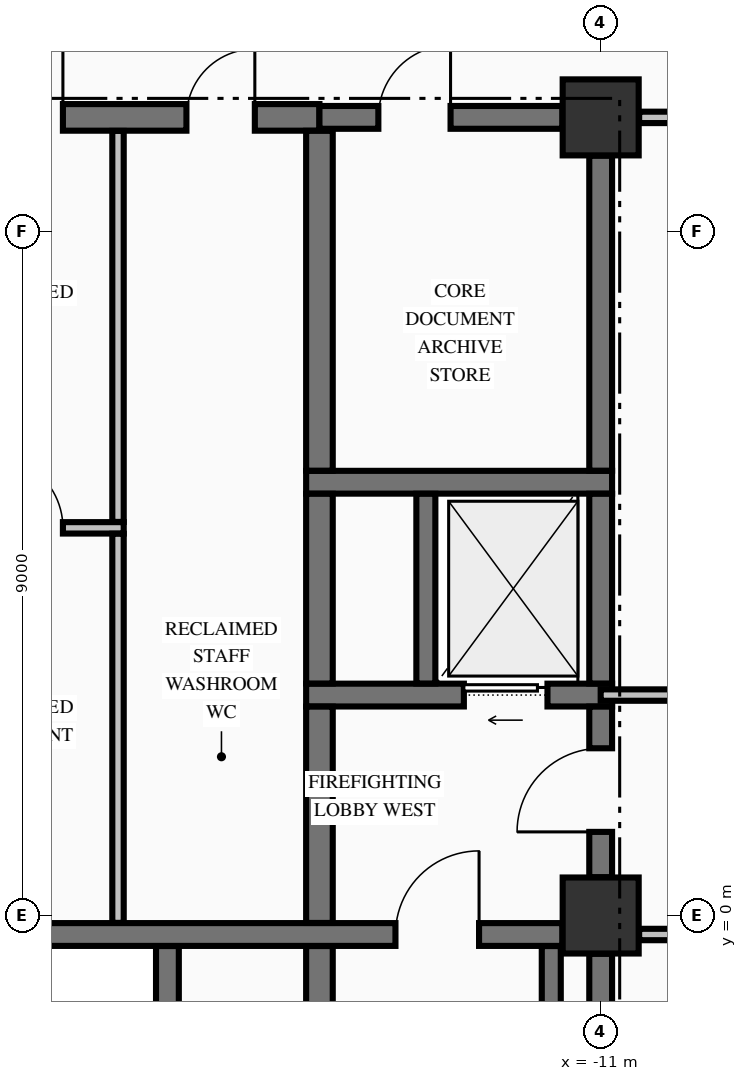
"""IFC4 building model, lengths in metres.
Left out: names, types, materials, properties, quantities, classifications, styles, units other than length and angle.
Written with IfcOpenShell. Run it as: python <this file> out.ifc"""

import sys

from ifc_helpers import new_model, si_unit, direction, frame, frame_2d, origin, origin_2d, place, context, subcontext, project, spatial, rectangle, extrude, element, fill, save


model = new_model("IFC4")
c1 = context("Model", 3, precision=1e-05, world=origin(), true_north=direction((0.0, 1.0)))
c2 = subcontext(c1, "Body", "Model", "MODEL_VIEW")
j1 = project(units=[si_unit("LENGTHUNIT", "METRE"), si_unit("PLANEANGLEUNIT", "RADIAN")], contexts=[c1])
p1 = place(None, origin())
s1 = spatial("IfcSite", under=j1, at=p1, CompositionType="ELEMENT")
p2 = place(p1, origin())
s2 = spatial("IfcBuilding", under=s1, at=p2, CompositionType="ELEMENT")
p3 = place(p2, frame((0.0, 0.0, 112.78)))
s3 = spatial("IfcBuildingStorey", under=s2, at=p3, CompositionType="ELEMENT", Elevation=112.78)
for number, where, z_axis, x_axis in (
    (1, (-11.0, 0.0, -0.25), (0.0, 0.0, 1.0), (1.0, 0.0, 0.0)),
    (2, (-11.0, 10.5, -0.25), (0.0, 0.0, 1.0), (1.0, 0.0, 0.0)),
):
    element("IfcColumn", number, at=place(p3, frame(where, z_axis=z_axis, x_axis=x_axis)), inside=s3, PredefinedType="COLUMN", context=c2, shape_type="SweptSolid", body=[
        extrude(rectangle(XDim=1.0, YDim=1.0, at=origin_2d()), origin(), (0.0, 0.0, 1.0), 3.395),
    ])
p4 = place(p3, frame((-19.496, -0.25, 0.0), z_axis=(0.0, 0.0, 1.0), x_axis=(1.0, 0.0, 0.0)))
e3 = element("IfcWall", 3, at=p4, inside=s3, PredefinedType="SHEAR", context=c2, shape_type="SweptSolid", body=[
    extrude(rectangle(XDim=7.992, YDim=0.3, at=frame_2d((3.996, 0.0))), origin(), (0.0, 0.0, 1.0), 3.145),
])
p5 = place(p4, frame((5.796, 0.0, 0.0)))
e4 = element("IfcOpeningElement", 4, at=p5, cuts=e3, PredefinedType="OPENING", context=c2, shape_type="SweptSolid", body=[
    extrude(rectangle(XDim=1.1, YDim=2.15, at=frame_2d((0.55, 1.075))), frame((0.0, 0.16, 0.0), z_axis=(0.0, -1.0, 0.0), x_axis=(1.0, 0.0, 0.0)), (0.0, 0.0, 1.0), 0.32),
])
p6 = place(p3, frame((-14.875, 2.9, 0.0), z_axis=(0.0, 0.0, 1.0), x_axis=(1.0, 0.0, 0.0)))
e5 = element("IfcWall", 5, at=p6, inside=s3, PredefinedType="SHEAR", context=c2, shape_type="SweptSolid", body=[
    extrude(rectangle(XDim=4.025, YDim=0.3, at=frame_2d((2.012, 0.0))), origin(), (0.0, 0.0, 1.0), 3.145),
])
p7 = place(p6, frame((2.075, 0.0, 0.0)))
e6 = element("IfcOpeningElement", 6, at=p7, cuts=e5, PredefinedType="OPENING", context=c2, shape_type="SweptSolid", body=[
    extrude(rectangle(XDim=1.1, YDim=2.2, at=frame_2d((0.55, 1.1))), frame((0.0, 0.16, 0.0), z_axis=(0.0, -1.0, 0.0), x_axis=(1.0, 0.0, 0.0)), (0.0, 0.0, 1.0), 0.32),
])
p8 = place(p3, frame((-14.875, 5.7, 0.0), z_axis=(0.0, 0.0, 1.0), x_axis=(1.0, 0.0, 0.0)))
e7 = element("IfcWall", 7, at=p8, inside=s3, PredefinedType="SHEAR", context=c2, shape_type="SweptSolid", body=[
    extrude(rectangle(XDim=4.025, YDim=0.3, at=frame_2d((2.012, 0.0))), origin(), (0.0, 0.0, 1.0), 3.145),
])
p9 = place(p3, frame((-19.496, 10.5, 0.0), z_axis=(0.0, 0.0, 1.0), x_axis=(1.0, 0.0, 0.0)))
e8 = element("IfcWall", 8, at=p9, inside=s3, PredefinedType="SHEAR", context=c2, shape_type="SweptSolid", body=[
    extrude(rectangle(XDim=4.796, YDim=0.35, at=frame_2d((2.398, 0.0))), origin(), (0.0, 0.0, 1.0), 3.145),
])
p10 = place(p9, frame((0.471, 0.0, 0.0)))
e9 = element("IfcOpeningElement", 9, at=p10, cuts=e8, PredefinedType="OPENING", context=c2, shape_type="SweptSolid", body=[
    extrude(rectangle(XDim=0.95, YDim=2.15, at=frame_2d((0.475, 1.075))), frame((0.0, 0.185, 0.0), z_axis=(0.0, -1.0, 0.0), x_axis=(1.0, 0.0, 0.0)), (0.0, 0.0, 1.0), 0.37),
])
p11 = place(p9, frame((3.046, 0.0, 0.0)))
e10 = element("IfcOpeningElement", 10, at=p11, cuts=e8, PredefinedType="OPENING", context=c2, shape_type="SweptSolid", body=[
    extrude(rectangle(XDim=0.9, YDim=2.15, at=frame_2d((0.45, 1.075))), frame((0.0, 0.185, 0.0), z_axis=(0.0, -1.0, 0.0), x_axis=(1.0, 0.0, 0.0)), (0.0, 0.0, 1.0), 0.37),
])
p12 = place(p3, frame((-14.7, 10.5, 0.0), z_axis=(0.0, 0.0, 1.0), x_axis=(1.0, 0.0, 0.0)))
e11 = element("IfcWall", 11, at=p12, inside=s3, PredefinedType="SHEAR", context=c2, shape_type="SweptSolid", body=[
    extrude(rectangle(XDim=3.196, YDim=0.3, at=frame_2d((1.598, 0.0))), origin(), (0.0, 0.0, 1.0), 3.145),
])
p13 = place(p12, frame((0.775, 0.0, 0.0)))
e12 = element("IfcOpeningElement", 12, at=p13, cuts=e11, PredefinedType="OPENING", context=c2, shape_type="SweptSolid", body=[
    extrude(rectangle(XDim=0.95, YDim=2.15, at=frame_2d((0.475, 1.075))), frame((0.0, 0.16, 0.0), z_axis=(0.0, -1.0, 0.0), x_axis=(1.0, 0.0, 0.0)), (0.0, 0.0, 1.0), 0.32),
])
p14 = place(p3, frame((-10.494, -0.25, 0.0), z_axis=(0.0, 0.0, 1.0), x_axis=(1.0, 0.0, 0.0)))
e13 = element("IfcWall", 13, at=p14, inside=s3, PredefinedType="PARTITIONING", context=c2, shape_type="SweptSolid", body=[
    extrude(rectangle(XDim=20.988, YDim=0.15, at=frame_2d((10.494, 0.0))), origin(), (0.0, 0.0, 1.0), 3.145),
])
p15 = place(p14, frame((13.994, 0.0, 0.0)))
e14 = element("IfcOpeningElement", 14, at=p15, cuts=e13, PredefinedType="OPENING", context=c2, shape_type="SweptSolid", body=[
    extrude(rectangle(XDim=1.1, YDim=2.15, at=frame_2d((0.55, 1.075))), frame((0.0, 0.085, 0.0), z_axis=(0.0, -1.0, 0.0), x_axis=(1.0, 0.0, 0.0)), (0.0, 0.0, 1.0), 0.17),
])
p16 = place(p14, frame((5.939, 0.0, 0.0)))
e15 = element("IfcOpeningElement", 15, at=p16, cuts=e13, PredefinedType="OPENING", context=c2, shape_type="SweptSolid", body=[
    extrude(rectangle(XDim=1.05, YDim=2.15, at=frame_2d((0.525, 1.075))), frame((0.0, 0.085, 0.0), z_axis=(0.0, -1.0, 0.0), x_axis=(1.0, 0.0, 0.0)), (0.0, 0.0, 1.0), 0.17),
])
p17 = place(p14, frame((18.089, 0.0, 0.0)))
e16 = element("IfcOpeningElement", 16, at=p17, cuts=e13, PredefinedType="OPENING", context=c2, shape_type="SweptSolid", body=[
    extrude(rectangle(XDim=0.95, YDim=2.15, at=frame_2d((0.475, 1.075))), frame((0.0, 0.085, 0.0), z_axis=(0.0, -1.0, 0.0), x_axis=(1.0, 0.0, 0.0)), (0.0, 0.0, 1.0), 0.17),
])
p18 = place(p3, frame((-11.0, 2.9, 0.0), z_axis=(0.0, 0.0, 1.0), x_axis=(1.0, 0.0, 0.0)))
e17 = element("IfcWall", 17, at=p18, inside=s3, PredefinedType="PARTITIONING", context=c2, shape_type="SweptSolid", body=[
    extrude(rectangle(XDim=22.0, YDim=0.15, at=frame_2d((11.0, 0.0))), origin(), (0.0, 0.0, 1.0), 3.145),
])
p19 = place(p18, frame((14.5, 0.0, 0.0)))
e18 = element("IfcOpeningElement", 18, at=p19, cuts=e17, PredefinedType="OPENING", context=c2, shape_type="SweptSolid", body=[
    extrude(rectangle(XDim=1.1, YDim=2.15, at=frame_2d((0.55, 1.075))), frame((0.0, 0.085, 0.0), z_axis=(0.0, -1.0, 0.0), x_axis=(1.0, 0.0, 0.0)), (0.0, 0.0, 1.0), 0.17),
])
p20 = place(p18, frame((6.445, 0.0, 0.0)))
e19 = element("IfcOpeningElement", 19, at=p20, cuts=e17, PredefinedType="OPENING", context=c2, shape_type="SweptSolid", body=[
    extrude(rectangle(XDim=1.05, YDim=2.15, at=frame_2d((0.525, 1.075))), frame((0.0, 0.085, 0.0), z_axis=(0.0, -1.0, 0.0), x_axis=(1.0, 0.0, 0.0)), (0.0, 0.0, 1.0), 0.17),
])
p21 = place(p18, frame((18.52, 0.0, 0.0)))
e20 = element("IfcOpeningElement", 20, at=p21, cuts=e17, PredefinedType="OPENING", context=c2, shape_type="SweptSolid", body=[
    extrude(rectangle(XDim=1.1, YDim=2.15, at=frame_2d((0.55, 1.075))), frame((0.0, 0.085, 0.0), z_axis=(0.0, -1.0, 0.0), x_axis=(1.0, 0.0, 0.0)), (0.0, 0.0, 1.0), 0.17),
])
p22 = place(p3, frame((-19.822, 5.1, 0.0), z_axis=(0.0, 0.0, 1.0), x_axis=(1.0, 0.0, 0.0)))
e21 = element("IfcWall", 21, at=p22, inside=s3, PredefinedType="PARTITIONING", context=c2, shape_type="SweptSolid", body=[
    extrude(rectangle(XDim=2.547, YDim=0.15, at=frame_2d((1.273, 0.0))), origin(), (0.0, 0.0, 1.0), 3.145),
])
p23 = place(p22, frame((0.797, 0.0, 0.0)))
e22 = element("IfcOpeningElement", 22, at=p23, cuts=e21, PredefinedType="OPENING", context=c2, shape_type="SweptSolid", body=[
    extrude(rectangle(XDim=0.95, YDim=2.15, at=frame_2d((0.475, 1.075))), frame((0.0, 0.085, 0.0), z_axis=(0.0, -1.0, 0.0), x_axis=(1.0, 0.0, 0.0)), (0.0, 0.0, 1.0), 0.17),
])
p24 = place(p3, frame((-10.494, 10.5, 0.0), z_axis=(0.0, 0.0, 1.0), x_axis=(1.0, 0.0, 0.0)))
e23 = element("IfcWall", 23, at=p24, inside=s3, PredefinedType="PARTITIONING", context=c2, shape_type="SweptSolid", body=[
    extrude(rectangle(XDim=20.988, YDim=0.15, at=frame_2d((10.494, 0.0))), origin(), (0.0, 0.0, 1.0), 3.145),
])
p25 = place(p24, frame((13.994, 0.0, 0.0)))
e24 = element("IfcOpeningElement", 24, at=p25, cuts=e23, PredefinedType="OPENING", context=c2, shape_type="SweptSolid", body=[
    extrude(rectangle(XDim=1.1, YDim=2.15, at=frame_2d((0.55, 1.075))), frame((0.0, 0.085, 0.0), z_axis=(0.0, -1.0, 0.0), x_axis=(1.0, 0.0, 0.0)), (0.0, 0.0, 1.0), 0.17),
])
p26 = place(p3, frame((-16.7, -9.773, 0.0), z_axis=(0.0, 0.0, 1.0), x_axis=(0.0, 1.0, 0.0)))
e25 = element("IfcWall", 25, at=p26, inside=s3, PredefinedType="SHEAR", context=c2, shape_type="SweptSolid", body=[
    extrude(rectangle(XDim=9.371, YDim=0.3, at=frame_2d((4.686, 0.0))), origin(), (0.0, 0.0, 1.0), 3.145),
])
p27 = place(p3, frame((-14.7, -9.773, 0.0), z_axis=(0.0, 0.0, 1.0), x_axis=(0.0, 1.0, 0.0)))
e26 = element("IfcWall", 26, at=p27, inside=s3, PredefinedType="SHEAR", context=c2, shape_type="SweptSolid", body=[
    extrude(rectangle(XDim=9.371, YDim=0.35, at=frame_2d((4.686, 0.0))), origin(), (0.0, 0.0, 1.0), 3.145),
])
p28 = place(p3, frame((-14.7, -0.098, 0.0), z_axis=(0.0, 0.0, 1.0), x_axis=(0.0, 1.0, 0.0)))
e27 = element("IfcWall", 27, at=p28, inside=s3, PredefinedType="SHEAR", context=c2, shape_type="SweptSolid", body=[
    extrude(rectangle(XDim=2.846, YDim=0.35, at=frame_2d((1.423, 0.0))), origin(), (0.0, 0.0, 1.0), 3.145),
])
p29 = place(p3, frame((-14.7, 3.052, 0.0), z_axis=(0.0, 0.0, 1.0), x_axis=(0.0, 1.0, 0.0)))
e28 = element("IfcWall", 28, at=p29, inside=s3, PredefinedType="SHEAR", context=c2, shape_type="SweptSolid", body=[
    extrude(rectangle(XDim=2.496, YDim=0.35, at=frame_2d((1.248, 0.0))), origin(), (0.0, 0.0, 1.0), 3.145),
])
p30 = place(p3, frame((-14.7, 5.852, 0.0), z_axis=(0.0, 0.0, 1.0), x_axis=(0.0, 1.0, 0.0)))
e29 = element("IfcWall", 29, at=p30, inside=s3, PredefinedType="SHEAR", context=c2, shape_type="SweptSolid", body=[
    extrude(rectangle(XDim=4.471, YDim=0.35, at=frame_2d((2.235, 0.0))), origin(), (0.0, 0.0, 1.0), 3.145),
])
p31 = place(p3, frame((-13.3, 3.052, 0.0), z_axis=(0.0, 0.0, 1.0), x_axis=(0.0, 1.0, 0.0)))
e30 = element("IfcWall", 30, at=p31, inside=s3, PredefinedType="SOLIDWALL", context=c2, shape_type="SweptSolid", body=[
    extrude(rectangle(XDim=2.496, YDim=0.25, at=frame_2d((1.248, 0.0))), origin(), (0.0, 0.0, 1.0), 3.145),
])
p32 = place(p3, frame((-11.65, -9.798, 0.0), z_axis=(0.0, 0.0, 1.0), x_axis=(0.0, 1.0, 0.0)))
e31 = element("IfcWall", 31, at=p32, inside=s3, PredefinedType="SOLIDWALL", context=c2, shape_type="SweptSolid", body=[
    extrude(rectangle(XDim=9.396, YDim=0.25, at=frame_2d((4.698, 0.0))), origin(), (0.0, 0.0, 1.0), 3.145),
])
p33 = place(p3, frame((-11.0, -9.446, 0.0), z_axis=(0.0, 0.0, 1.0), x_axis=(0.0, 1.0, 0.0)))
e32 = element("IfcWall", 32, at=p33, inside=s3, PredefinedType="SHEAR", context=c2, shape_type="SweptSolid", body=[
    extrude(rectangle(XDim=8.942, YDim=0.3, at=frame_2d((4.471, 0.0))), origin(), (0.0, 0.0, 1.0), 3.145),
])
p34 = place(p3, frame((-11.0, 0.504, 0.0), z_axis=(0.0, 0.0, 1.0), x_axis=(0.0, 1.0, 0.0)))
e33 = element("IfcWall", 33, at=p34, inside=s3, PredefinedType="SHEAR", context=c2, shape_type="SweptSolid", body=[
    extrude(rectangle(XDim=2.244, YDim=0.3, at=frame_2d((1.122, 0.0))), origin(), (0.0, 0.0, 1.0), 3.145),
])
p35 = place(p34, frame((0.596, 0.0, 0.0)))
e34 = element("IfcOpeningElement", 34, at=p35, cuts=e33, PredefinedType="OPENING", context=c2, shape_type="SweptSolid", body=[
    extrude(rectangle(XDim=1.1, YDim=2.15, at=frame_2d((0.55, 1.075))), frame((0.0, 0.16, 0.0), z_axis=(0.0, -1.0, 0.0), x_axis=(1.0, 0.0, 0.0)), (0.0, 0.0, 1.0), 0.32),
])
p36 = place(p3, frame((-11.0, 3.052, 0.0), z_axis=(0.0, 0.0, 1.0), x_axis=(0.0, 1.0, 0.0)))
e35 = element("IfcWall", 35, at=p36, inside=s3, PredefinedType="SHEAR", context=c2, shape_type="SweptSolid", body=[
    extrude(rectangle(XDim=2.496, YDim=0.3, at=frame_2d((1.248, 0.0))), origin(), (0.0, 0.0, 1.0), 3.145),
])
p37 = place(p3, frame((-11.0, 5.852, 0.0), z_axis=(0.0, 0.0, 1.0), x_axis=(0.0, 1.0, 0.0)))
e36 = element("IfcWall", 36, at=p37, inside=s3, PredefinedType="SHEAR", context=c2, shape_type="SweptSolid", body=[
    extrude(rectangle(XDim=4.144, YDim=0.3, at=frame_2d((2.072, 0.0))), origin(), (0.0, 0.0, 1.0), 3.145),
])
p38 = place(p3, frame((-17.35, -0.097, 0.0), z_axis=(0.0, 0.0, 1.0), x_axis=(0.0, 1.0, 0.0)))
e37 = element("IfcWall", 37, at=p38, inside=s3, PredefinedType="PARTITIONING", context=c2, shape_type="SweptSolid", body=[
    extrude(rectangle(XDim=5.119, YDim=0.15, at=frame_2d((2.56, 0.0))), origin(), (0.0, 0.0, 1.0), 3.145),
])
p39 = place(p3, frame((-17.35, 5.178, 0.0), z_axis=(0.0, 0.0, 1.0), x_axis=(0.0, 1.0, 0.0)))
e38 = element("IfcWall", 38, at=p39, inside=s3, PredefinedType="PARTITIONING", context=c2, shape_type="SweptSolid", body=[
    extrude(rectangle(XDim=5.144, YDim=0.15, at=frame_2d((2.572, 0.0))), origin(), (0.0, 0.0, 1.0), 3.145),
])
p40 = place(p5, origin())
e39 = element("IfcDoor", 39, at=p40, inside=s3, OperationType="SINGLE_SWING_RIGHT", PredefinedType="DOOR", context=c2, shape_type="SweptSolid", body=[
    extrude(rectangle(XDim=1.1, YDim=2.15, at=frame_2d((0.55, 1.075))), frame((0.0, 0.025, 0.0), z_axis=(0.0, -1.0, 0.0), x_axis=(1.0, 0.0, 0.0)), (0.0, 0.0, 1.0), 0.05),
])
fill(e4, e39)
p41 = place(p35, origin())
e40 = element("IfcDoor", 40, at=p41, inside=s3, OperationType="SINGLE_SWING_LEFT", PredefinedType="DOOR", context=c2, shape_type="SweptSolid", body=[
    extrude(rectangle(XDim=1.1, YDim=2.15, at=frame_2d((0.55, 1.075))), frame((0.0, 0.025, 0.0), z_axis=(0.0, -1.0, 0.0), x_axis=(1.0, 0.0, 0.0)), (0.0, 0.0, 1.0), 0.05),
])
fill(e34, e40)
p42 = place(p7, origin())
e41 = element("IfcDoor", 41, at=p42, inside=s3, OperationType="SLIDING_TO_LEFT", PredefinedType="DOOR", context=c2, shape_type="SweptSolid", body=[
    extrude(rectangle(XDim=1.1, YDim=2.2, at=frame_2d((0.55, 1.1))), frame((0.0, 0.025, 0.0), z_axis=(0.0, -1.0, 0.0), x_axis=(1.0, 0.0, 0.0)), (0.0, 0.0, 1.0), 0.05),
])
fill(e6, e41)
p43 = place(p13, origin())
e42 = element("IfcDoor", 42, at=p43, inside=s3, OperationType="SINGLE_SWING_RIGHT", PredefinedType="DOOR", context=c2, shape_type="SweptSolid", body=[
    extrude(rectangle(XDim=0.95, YDim=2.15, at=frame_2d((0.475, 1.075))), frame((0.0, 0.025, 0.0), z_axis=(0.0, -1.0, 0.0), x_axis=(1.0, 0.0, 0.0)), (0.0, 0.0, 1.0), 0.05),
])
fill(e12, e42)
p44 = place(p10, origin())
e43 = element("IfcDoor", 43, at=p44, inside=s3, OperationType="SINGLE_SWING_RIGHT", PredefinedType="DOOR", context=c2, shape_type="SweptSolid", body=[
    extrude(rectangle(XDim=0.95, YDim=2.15, at=frame_2d((0.475, 1.075))), frame((0.0, 0.025, 0.0), z_axis=(0.0, -1.0, 0.0), x_axis=(1.0, 0.0, 0.0)), (0.0, 0.0, 1.0), 0.05),
])
fill(e9, e43)
p45 = place(p23, origin())
e44 = element("IfcDoor", 44, at=p45, inside=s3, OperationType="SINGLE_SWING_LEFT", PredefinedType="DOOR", context=c2, shape_type="SweptSolid", body=[
    extrude(rectangle(XDim=0.95, YDim=2.15, at=frame_2d((0.475, 1.075))), frame((0.0, 0.025, 0.0), z_axis=(0.0, -1.0, 0.0), x_axis=(1.0, 0.0, 0.0)), (0.0, 0.0, 1.0), 0.05),
])
fill(e22, e44)
p46 = place(p11, origin())
e45 = element("IfcDoor", 45, at=p46, inside=s3, OperationType="SINGLE_SWING_RIGHT", PredefinedType="DOOR", context=c2, shape_type="SweptSolid", body=[
    extrude(rectangle(XDim=0.9, YDim=2.15, at=frame_2d((0.45, 1.075))), frame((0.0, 0.025, 0.0), z_axis=(0.0, -1.0, 0.0), x_axis=(1.0, 0.0, 0.0)), (0.0, 0.0, 1.0), 0.05),
])
fill(e10, e45)
save(model, sys.argv[1])
